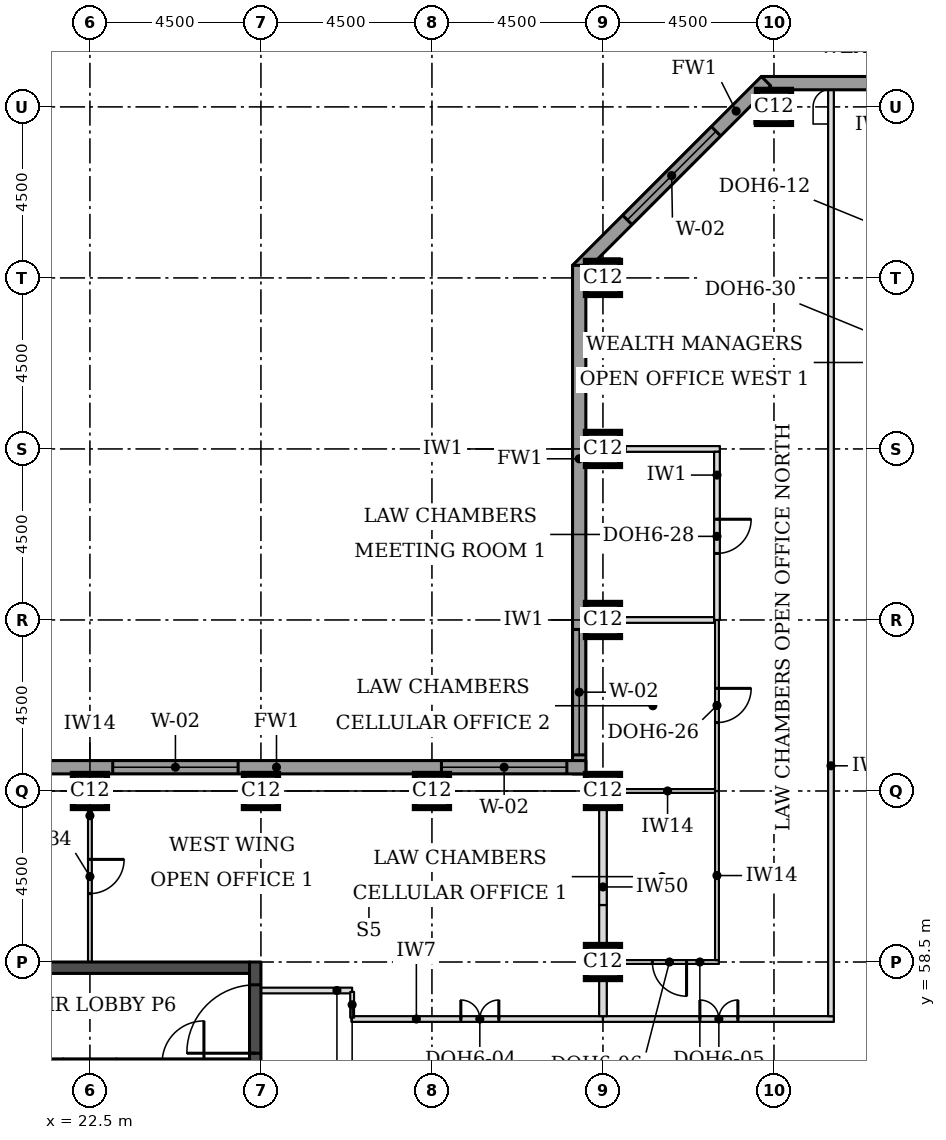
"""IFC4 building model, lengths in metres.
Left out: names, types, materials, properties, quantities, classifications, styles, units other than length and angle.
Written with IfcOpenShell. Run it as: python <this file> out.ifc"""

import sys

from ifc_helpers import new_model, si_unit, direction, frame, frame_2d, origin, origin_2d, place, context, subcontext, project, spatial, rectangle, extrude, element, fill, save


model = new_model("IFC4")
c1 = context("Model", 3, precision=1e-05, world=origin(), true_north=direction((0.0, 1.0)))
c2 = subcontext(c1, "Body", "Model", "MODEL_VIEW")
j1 = project(units=[si_unit("LENGTHUNIT", "METRE"), si_unit("PLANEANGLEUNIT", "RADIAN")], contexts=[c1])
p1 = place(None, origin())
s1 = spatial("IfcSite", under=j1, at=p1, CompositionType="ELEMENT")
p2 = place(p1, origin())
s2 = spatial("IfcBuilding", under=s1, at=p2, CompositionType="ELEMENT")
p3 = place(p2, frame((0.0, 0.0, 184.7)))
s3 = spatial("IfcBuildingStorey", under=s2, at=p3, CompositionType="ELEMENT", Elevation=184.7)
for number, where, z_axis, x_axis in (
    (1, (36.0, 58.5, 0.0), (0.0, 0.0, 1.0), (1.0, 0.0, 0.0)),
    (2, (22.5, 63.0, 0.0), (0.0, 0.0, 1.0), (1.0, 0.0, 0.0)),
    (3, (27.0, 63.0, 0.0), (0.0, 0.0, 1.0), (1.0, 0.0, 0.0)),
    (4, (31.5, 63.0, 0.0), (0.0, 0.0, 1.0), (1.0, 0.0, 0.0)),
    (5, (36.0, 63.0, 0.0), (0.0, 0.0, 1.0), (1.0, 0.0, 0.0)),
    (6, (36.0, 67.5, 0.0), (0.0, 0.0, 1.0), (1.0, 0.0, 0.0)),
    (7, (36.0, 72.0, 0.0), (0.0, 0.0, 1.0), (1.0, 0.0, 0.0)),
    (8, (36.0, 76.5, 0.0), (0.0, 0.0, 1.0), (1.0, 0.0, 0.0)),
    (9, (40.5, 81.0, 0.0), (0.0, 0.0, 1.0), (1.0, 0.0, 0.0)),
):
    element("IfcColumn", number, at=place(p3, frame(where, z_axis=z_axis, x_axis=x_axis)), inside=s3, PredefinedType="COLUMN", context=c2, shape_type="SweptSolid", body=[
        extrude(rectangle(XDim=0.9, YDim=0.9, at=origin_2d()), origin(), (0.0, 0.0, 1.0), 3.7),
    ])
p4 = place(p3, frame((18.3, 58.35, 0.0), z_axis=(0.0, 0.0, 1.0), x_axis=(1.0, 0.0, 0.0)))
e10 = element("IfcWall", 10, at=p4, inside=s3, PredefinedType="SHEAR", context=c2, shape_type="SweptSolid", body=[
    extrude(rectangle(XDim=8.4, YDim=0.3, at=frame_2d((4.2, 0.0))), origin(), (0.0, 0.0, 1.0), 3.7),
])
p5 = place(p3, frame((26.85, 49.5, 0.0), z_axis=(0.0, 0.0, 1.0), x_axis=(0.0, 1.0, 0.0)))
e11 = element("IfcWall", 11, at=p5, inside=s3, PredefinedType="SHEAR", context=c2, shape_type="SweptSolid", body=[
    extrude(rectangle(XDim=9.0, YDim=0.3, at=frame_2d((4.5, 0.0))), origin(), (0.0, 0.0, 1.0), 3.7),
])
p6 = place(p5, frame((6.6, 0.0, 0.0)))
e12 = element("IfcOpeningElement", 12, at=p6, cuts=e11, PredefinedType="OPENING", context=c2, shape_type="SweptSolid", body=[
    extrude(rectangle(XDim=1.8, YDim=2.1, at=frame_2d((0.9, 1.05))), frame((0.0, 0.16, 0.0), z_axis=(0.0, -1.0, 0.0), x_axis=(1.0, 0.0, 0.0)), (0.0, 0.0, 1.0), 0.32),
])
p7 = place(p3, frame((72.331, 81.625, 0.0), z_axis=(0.0, 0.0, 1.0), x_axis=(-1.0, 0.0, 0.0)))
e13 = element("IfcWall", 13, at=p7, inside=s3, PredefinedType="STANDARD", context=c2, shape_type="SweptSolid", body=[
    extrude(rectangle(XDim=32.163, YDim=0.35, at=frame_2d((16.081, 0.0))), origin(), (0.0, 0.0, 1.0), 3.525),
])
p8 = place(p7, frame((5.431, 0.0, 0.9)))
e14 = element("IfcOpeningElement", 14, at=p8, cuts=e13, PredefinedType="OPENING", context=c2, shape_type="SweptSolid", body=[
    extrude(rectangle(XDim=3.3, YDim=1.9, at=frame_2d((1.65, 0.95))), frame((0.0, 0.185, 0.0), z_axis=(0.0, -1.0, 0.0), x_axis=(1.0, 0.0, 0.0)), (0.0, 0.0, 1.0), 0.37),
])
p9 = place(p7, frame((9.931, 0.0, 0.9)))
e15 = element("IfcOpeningElement", 15, at=p9, cuts=e13, PredefinedType="OPENING", context=c2, shape_type="SweptSolid", body=[
    extrude(rectangle(XDim=3.3, YDim=1.9, at=frame_2d((1.65, 0.95))), frame((0.0, 0.185, 0.0), z_axis=(0.0, -1.0, 0.0), x_axis=(1.0, 0.0, 0.0)), (0.0, 0.0, 1.0), 0.37),
])
p10 = place(p7, frame((14.431, 0.0, 0.9)))
e16 = element("IfcOpeningElement", 16, at=p10, cuts=e13, PredefinedType="OPENING", context=c2, shape_type="SweptSolid", body=[
    extrude(rectangle(XDim=3.3, YDim=1.9, at=frame_2d((1.65, 0.95))), frame((0.0, 0.185, 0.0), z_axis=(0.0, -1.0, 0.0), x_axis=(1.0, 0.0, 0.0)), (0.0, 0.0, 1.0), 0.37),
])
p11 = place(p7, frame((18.931, 0.0, 0.9)))
e17 = element("IfcOpeningElement", 17, at=p11, cuts=e13, PredefinedType="OPENING", context=c2, shape_type="SweptSolid", body=[
    extrude(rectangle(XDim=3.3, YDim=1.9, at=frame_2d((1.65, 0.95))), frame((0.0, 0.185, 0.0), z_axis=(0.0, -1.0, 0.0), x_axis=(1.0, 0.0, 0.0)), (0.0, 0.0, 1.0), 0.37),
])
p12 = place(p7, frame((23.431, 0.0, 0.9)))
e18 = element("IfcOpeningElement", 18, at=p12, cuts=e13, PredefinedType="OPENING", context=c2, shape_type="SweptSolid", body=[
    extrude(rectangle(XDim=3.3, YDim=1.9, at=frame_2d((1.65, 0.95))), frame((0.0, 0.185, 0.0), z_axis=(0.0, -1.0, 0.0), x_axis=(1.0, 0.0, 0.0)), (0.0, 0.0, 1.0), 0.37),
])
p13 = place(p3, frame((40.292, 81.676, 0.0), z_axis=(0.0, 0.0, 1.0), x_axis=(-0.707106781187, -0.707106781187, 0.0)))
e19 = element("IfcWall", 19, at=p13, inside=s3, PredefinedType="STANDARD", context=c2, shape_type="SweptSolid", body=[
    extrude(rectangle(XDim=7.027, YDim=0.35, at=frame_2d((3.513, 0.0))), origin(), (0.0, 0.0, 1.0), 3.525),
])
p14 = place(p13, frame((1.863, 0.0, 0.9)))
e20 = element("IfcOpeningElement", 20, at=p14, cuts=e19, PredefinedType="OPENING", context=c2, shape_type="SweptSolid", body=[
    extrude(rectangle(XDim=3.3, YDim=1.9, at=frame_2d((1.65, 0.95))), frame((0.0, 0.185, 0.0), z_axis=(0.0, -1.0, 0.0), x_axis=(1.0, 0.0, 0.0)), (0.0, 0.0, 1.0), 0.37),
])
p15 = place(p3, frame((35.375, 76.831, 0.0), z_axis=(0.0, 0.0, 1.0), x_axis=(0.0, -1.0, 0.0)))
e21 = element("IfcWall", 21, at=p15, inside=s3, PredefinedType="STANDARD", context=c2, shape_type="SweptSolid", body=[
    extrude(rectangle(XDim=13.381, YDim=0.35, at=frame_2d((6.691, 0.0))), origin(), (0.0, 0.0, 1.0), 3.525),
])
p16 = place(p15, frame((9.581, 0.0, 0.9)))
e22 = element("IfcOpeningElement", 22, at=p16, cuts=e21, PredefinedType="OPENING", context=c2, shape_type="SweptSolid", body=[
    extrude(rectangle(XDim=3.3, YDim=1.9, at=frame_2d((1.65, 0.95))), frame((0.0, 0.185, 0.0), z_axis=(0.0, -1.0, 0.0), x_axis=(1.0, 0.0, 0.0)), (0.0, 0.0, 1.0), 0.37),
])
p17 = place(p3, frame((35.55, 63.625, 0.0), z_axis=(0.0, 0.0, 1.0), x_axis=(-1.0, 0.0, 0.0)))
e23 = element("IfcWall", 23, at=p17, inside=s3, PredefinedType="STANDARD", context=c2, shape_type="SweptSolid", body=[
    extrude(rectangle(XDim=17.881, YDim=0.35, at=frame_2d((8.941, 0.0))), origin(), (0.0, 0.0, 1.0), 3.525),
])
p18 = place(p17, frame((0.5, 0.0, 0.9)))
e24 = element("IfcOpeningElement", 24, at=p18, cuts=e23, PredefinedType="OPENING", context=c2, shape_type="SweptSolid", body=[
    extrude(rectangle(XDim=3.3, YDim=1.9, at=frame_2d((1.65, 0.95))), frame((0.0, 0.185, 0.0), z_axis=(0.0, -1.0, 0.0), x_axis=(1.0, 0.0, 0.0)), (0.0, 0.0, 1.0), 0.37),
])
p19 = place(p17, frame((9.15, 0.0, 0.9)))
e25 = element("IfcOpeningElement", 25, at=p19, cuts=e23, PredefinedType="OPENING", context=c2, shape_type="SweptSolid", body=[
    extrude(rectangle(XDim=3.3, YDim=1.9, at=frame_2d((1.65, 0.95))), frame((0.0, 0.185, 0.0), z_axis=(0.0, -1.0, 0.0), x_axis=(1.0, 0.0, 0.0)), (0.0, 0.0, 1.0), 0.37),
])
p20 = place(p3, frame((29.38, 57.0, 0.0), z_axis=(0.0, 0.0, 1.0), x_axis=(1.0, 0.0, 0.0)))
e26 = element("IfcWall", 26, at=p20, inside=s3, PredefinedType="PARTITIONING", context=c2, shape_type="SweptSolid", body=[
    extrude(rectangle(XDim=6.62, YDim=0.15, at=frame_2d((3.31, 0.0))), origin(), (0.0, 0.0, 1.0), 3.55),
])
p21 = place(p20, frame((2.88, 0.0, 0.0)))
e27 = element("IfcOpeningElement", 27, at=p21, cuts=e26, PredefinedType="OPENING", context=c2, shape_type="SweptSolid", body=[
    extrude(rectangle(XDim=1.0, YDim=2.1, at=frame_2d((0.5, 1.05))), frame((0.0, 0.085, 0.0), z_axis=(0.0, -1.0, 0.0), x_axis=(1.0, 0.0, 0.0)), (0.0, 0.0, 1.0), 0.17),
])
p22 = place(p3, frame((36.0, 57.0, 0.0), z_axis=(0.0, 0.0, 1.0), x_axis=(1.0, 0.0, 0.0)))
e28 = element("IfcWall", 28, at=p22, inside=s3, PredefinedType="PARTITIONING", context=c2, shape_type="SweptSolid", body=[
    extrude(rectangle(XDim=6.075, YDim=0.15, at=frame_2d((3.038, 0.0))), origin(), (0.0, 0.0, 1.0), 3.55),
])
p23 = place(p22, frame((2.55, 0.0, 0.0)))
e29 = element("IfcOpeningElement", 29, at=p23, cuts=e28, PredefinedType="OPENING", context=c2, shape_type="SweptSolid", body=[
    extrude(rectangle(XDim=1.0, YDim=2.1, at=frame_2d((0.5, 1.05))), frame((0.0, 0.085, 0.0), z_axis=(0.0, -1.0, 0.0), x_axis=(1.0, 0.0, 0.0)), (0.0, 0.0, 1.0), 0.17),
])
p24 = place(p3, frame((36.45, 58.5, 0.0), z_axis=(0.0, 0.0, 1.0), x_axis=(1.0, 0.0, 0.0)))
e30 = element("IfcWall", 30, at=p24, inside=s3, PredefinedType="PARTITIONING", context=c2, shape_type="SweptSolid", body=[
    extrude(rectangle(XDim=2.6, YDim=0.1, at=frame_2d((1.3, 0.0))), origin(), (0.0, 0.0, 1.0), 3.55),
])
p25 = place(p24, frame((0.85, 0.0, 0.0)))
e31 = element("IfcOpeningElement", 31, at=p25, cuts=e30, PredefinedType="OPENING", context=c2, shape_type="SweptSolid", body=[
    extrude(rectangle(XDim=0.9, YDim=2.1, at=frame_2d((0.45, 1.05))), frame((0.0, 0.06, 0.0), z_axis=(0.0, -1.0, 0.0), x_axis=(1.0, 0.0, 0.0)), (0.0, 0.0, 1.0), 0.12),
])
p26 = place(p3, frame((36.45, 63.0, 0.0), z_axis=(0.0, 0.0, 1.0), x_axis=(1.0, 0.0, 0.0)))
e32 = element("IfcWall", 32, at=p26, inside=s3, PredefinedType="PARTITIONING", context=c2, shape_type="SweptSolid", body=[
    extrude(rectangle(XDim=2.5, YDim=0.1, at=frame_2d((1.25, 0.0))), origin(), (0.0, 0.0, 1.0), 3.55),
])
p27 = place(p3, frame((35.55, 67.5, 0.0), z_axis=(0.0, 0.0, 1.0), x_axis=(1.0, 0.0, 0.0)))
e33 = element("IfcWall", 33, at=p27, inside=s3, PredefinedType="PARTITIONING", context=c2, shape_type="SweptSolid", body=[
    extrude(rectangle(XDim=3.375, YDim=0.15, at=frame_2d((1.688, 0.0))), origin(), (0.0, 0.0, 1.0), 3.55),
])
p28 = place(p3, frame((35.55, 72.0, 0.0), z_axis=(0.0, 0.0, 1.0), x_axis=(1.0, 0.0, 0.0)))
e34 = element("IfcWall", 34, at=p28, inside=s3, PredefinedType="PARTITIONING", context=c2, shape_type="SweptSolid", body=[
    extrude(rectangle(XDim=3.525, YDim=0.15, at=frame_2d((1.762, 0.0))), origin(), (0.0, 0.0, 1.0), 3.55),
])
p29 = place(p3, frame((36.0, 57.075, 0.0), z_axis=(0.0, 0.0, 1.0), x_axis=(0.0, 1.0, 0.0)))
e35 = element("IfcWall", 35, at=p29, inside=s3, PredefinedType="PARTITIONING", context=c2, shape_type="SweptSolid", body=[
    extrude(rectangle(XDim=0.975, YDim=0.2, at=frame_2d((0.488, 0.0))), origin(), (0.0, 0.0, 1.0), 2.8),
])
p30 = place(p3, frame((42.0, 57.075, 0.0), z_axis=(0.0, 0.0, 1.0), x_axis=(0.0, 1.0, 0.0)))
e36 = element("IfcWall", 36, at=p30, inside=s3, PredefinedType="PARTITIONING", context=c2, shape_type="SweptSolid", body=[
    extrude(rectangle(XDim=24.375, YDim=0.15, at=frame_2d((12.188, 0.0))), origin(), (0.0, 0.0, 1.0), 3.55),
])
p31 = place(p3, frame((39.0, 58.55, 0.0), z_axis=(0.0, 0.0, 1.0), x_axis=(0.0, 1.0, 0.0)))
e37 = element("IfcWall", 37, at=p31, inside=s3, PredefinedType="PARTITIONING", context=c2, shape_type="SweptSolid", body=[
    extrude(rectangle(XDim=4.45, YDim=0.1, at=frame_2d((2.225, 0.0))), origin(), (0.0, 0.0, 1.0), 3.55),
])
p32 = place(p3, frame((36.0, 58.92, 0.0), z_axis=(0.0, 0.0, 1.0), x_axis=(0.0, 1.0, 0.0)))
e38 = element("IfcWall", 38, at=p32, inside=s3, PredefinedType="PARTITIONING", context=c2, shape_type="SweptSolid", body=[
    extrude(rectangle(XDim=1.08, YDim=0.2, at=frame_2d((0.54, 0.0))), origin(), (0.0, 0.0, 1.0), 2.8),
])
p33 = place(p3, frame((36.0, 60.0, 0.0), z_axis=(0.0, 0.0, 1.0), x_axis=(0.0, 1.0, 0.0)))
e39 = element("IfcWall", 39, at=p33, inside=s3, PredefinedType="PARTITIONING", context=c2, shape_type="SweptSolid", body=[
    extrude(rectangle(XDim=2.55, YDim=0.2, at=frame_2d((1.275, 0.0))), origin(), (0.0, 0.0, 1.0), 2.8),
])
p34 = place(p3, frame((39.0, 63.0, 0.0), z_axis=(0.0, 0.0, 1.0), x_axis=(0.0, 1.0, 0.0)))
e40 = element("IfcWall", 40, at=p34, inside=s3, PredefinedType="PARTITIONING", context=c2, shape_type="SweptSolid", body=[
    extrude(rectangle(XDim=4.5, YDim=0.1, at=frame_2d((2.25, 0.0))), origin(), (0.0, 0.0, 1.0), 3.55),
])
p35 = place(p34, frame((1.8, 0.0, 0.0)))
e41 = element("IfcOpeningElement", 41, at=p35, cuts=e40, PredefinedType="OPENING", context=c2, shape_type="SweptSolid", body=[
    extrude(rectangle(XDim=0.9, YDim=2.1, at=frame_2d((0.45, 1.05))), frame((0.0, 0.06, 0.0), z_axis=(0.0, -1.0, 0.0), x_axis=(1.0, 0.0, 0.0)), (0.0, 0.0, 1.0), 0.12),
])
p36 = place(p3, frame((39.0, 67.5, 0.0), z_axis=(0.0, 0.0, 1.0), x_axis=(0.0, 1.0, 0.0)))
e42 = element("IfcWall", 42, at=p36, inside=s3, PredefinedType="PARTITIONING", context=c2, shape_type="SweptSolid", body=[
    extrude(rectangle(XDim=4.425, YDim=0.15, at=frame_2d((2.212, 0.0))), origin(), (0.0, 0.0, 1.0), 3.55),
])
p37 = place(p36, frame((1.75, 0.0, 0.0)))
e43 = element("IfcOpeningElement", 43, at=p37, cuts=e42, PredefinedType="OPENING", context=c2, shape_type="SweptSolid", body=[
    extrude(rectangle(XDim=0.9, YDim=2.1, at=frame_2d((0.45, 1.05))), frame((0.0, 0.085, 0.0), z_axis=(0.0, -1.0, 0.0), x_axis=(1.0, 0.0, 0.0)), (0.0, 0.0, 1.0), 0.17),
])
p38 = place(p3, frame((22.5, 63.0, 0.0), z_axis=(0.0, 0.0, 1.0), x_axis=(0.0, -1.0, 0.0)))
e44 = element("IfcWall", 44, at=p38, inside=s3, PredefinedType="PARTITIONING", context=c2, shape_type="SweptSolid", body=[
    extrude(rectangle(XDim=4.5, YDim=0.1, at=frame_2d((2.25, 0.0))), origin(), (0.0, 0.0, 1.0), 3.55),
])
p39 = place(p38, frame((1.8, 0.0, 0.0)))
e45 = element("IfcOpeningElement", 45, at=p39, cuts=e44, PredefinedType="OPENING", context=c2, shape_type="SweptSolid", body=[
    extrude(rectangle(XDim=0.9, YDim=2.1, at=frame_2d((0.45, 1.05))), frame((0.0, 0.06, 0.0), z_axis=(0.0, -1.0, 0.0), x_axis=(1.0, 0.0, 0.0)), (0.0, 0.0, 1.0), 0.12),
])
p40 = place(p3, frame((27.0, 57.75, 0.0), z_axis=(0.0, 0.0, 1.0), x_axis=(1.0, 0.0, 0.0)))
e46 = element("IfcWall", 46, at=p40, inside=s3, PredefinedType="PARTITIONING", context=c2, shape_type="SweptSolid", body=[
    extrude(rectangle(XDim=2.4, YDim=0.15, at=frame_2d((1.2, 0.0))), origin(), (0.0, 0.0, 1.0), 3.55),
])
p41 = place(p3, frame((29.4, 57.715, 0.0), z_axis=(0.0, 0.0, 1.0), x_axis=(0.0, -1.0, 0.0)))
e47 = element("IfcWall", 47, at=p41, inside=s3, PredefinedType="PARTITIONING", context=c2, shape_type="SweptSolid", body=[
    extrude(rectangle(XDim=0.68, YDim=0.1, at=frame_2d((0.34, 0.0))), origin(), (0.0, 0.0, 1.0), 3.55),
])
p42 = place(p3, frame((21.8, 55.85, 0.0), z_axis=(0.0, 0.0, 1.0), x_axis=(1.0, 0.0, 0.0)))
e48 = element("IfcWall", 48, at=p42, inside=s3, PredefinedType="SOLIDWALL", context=c2, shape_type="SweptSolid", body=[
    extrude(rectangle(XDim=1.4, YDim=0.2, at=frame_2d((0.7, 0.0))), origin(), (0.0, 0.0, 1.0), 3.55),
])
p43 = place(p3, frame((18.3, 55.85, 0.0), z_axis=(0.0, 0.0, 1.0), x_axis=(1.0, 0.0, 0.0)))
e49 = element("IfcWall", 49, at=p43, inside=s3, PredefinedType="SOLIDWALL", context=c2, shape_type="SweptSolid", body=[
    extrude(rectangle(XDim=3.5, YDim=0.2, at=frame_2d((1.75, 0.0))), origin(), (0.0, 0.0, 1.0), 3.55),
])
p44 = place(p43, frame((1.2, 0.0, 0.0)))
e50 = element("IfcOpeningElement", 50, at=p44, cuts=e49, PredefinedType="OPENING", context=c2, shape_type="SweptSolid", body=[
    extrude(rectangle(XDim=1.1, YDim=2.1, at=frame_2d((0.55, 1.05))), frame((0.0, 0.11, 0.0), z_axis=(0.0, -1.0, 0.0), x_axis=(1.0, 0.0, 0.0)), (0.0, 0.0, 1.0), 0.22),
])
p45 = place(p3, frame((23.2, 55.85, 0.0), z_axis=(0.0, 0.0, 1.0), x_axis=(1.0, 0.0, 0.0)))
e51 = element("IfcWall", 51, at=p45, inside=s3, PredefinedType="SOLIDWALL", context=c2, shape_type="SweptSolid", body=[
    extrude(rectangle(XDim=3.5, YDim=0.2, at=frame_2d((1.75, 0.0))), origin(), (0.0, 0.0, 1.0), 3.55),
])
p46 = place(p45, frame((1.2, 0.0, 0.0)))
e52 = element("IfcOpeningElement", 52, at=p46, cuts=e51, PredefinedType="OPENING", context=c2, shape_type="SweptSolid", body=[
    extrude(rectangle(XDim=1.1, YDim=2.1, at=frame_2d((0.55, 1.05))), frame((0.0, 0.11, 0.0), z_axis=(0.0, -1.0, 0.0), x_axis=(1.0, 0.0, 0.0)), (0.0, 0.0, 1.0), 0.22),
])
p47 = place(p14, origin())
e53 = element("IfcWindow", 53, at=p47, inside=s3, PartitioningType="SINGLE_PANEL", PredefinedType="WINDOW", context=c2, shape_type="SweptSolid", body=[
    extrude(rectangle(XDim=3.3, YDim=1.9, at=frame_2d((1.65, 0.95))), frame((0.0, 0.085, 0.0), z_axis=(0.0, -1.0, 0.0), x_axis=(1.0, 0.0, 0.0)), (0.0, 0.0, 1.0), 0.06),
])
fill(e20, e53)
p48 = place(p16, origin())
e54 = element("IfcWindow", 54, at=p48, inside=s3, PartitioningType="SINGLE_PANEL", PredefinedType="WINDOW", context=c2, shape_type="SweptSolid", body=[
    extrude(rectangle(XDim=3.3, YDim=1.9, at=frame_2d((1.65, 0.95))), frame((0.0, 0.085, 0.0), z_axis=(0.0, -1.0, 0.0), x_axis=(1.0, 0.0, 0.0)), (0.0, 0.0, 1.0), 0.06),
])
fill(e22, e54)
p49 = place(p18, origin())
e55 = element("IfcWindow", 55, at=p49, inside=s3, PartitioningType="SINGLE_PANEL", PredefinedType="WINDOW", context=c2, shape_type="SweptSolid", body=[
    extrude(rectangle(XDim=3.3, YDim=1.9, at=frame_2d((1.65, 0.95))), frame((0.0, 0.085, 0.0), z_axis=(0.0, -1.0, 0.0), x_axis=(1.0, 0.0, 0.0)), (0.0, 0.0, 1.0), 0.06),
])
fill(e24, e55)
p50 = place(p19, origin())
e56 = element("IfcWindow", 56, at=p50, inside=s3, PartitioningType="SINGLE_PANEL", PredefinedType="WINDOW", context=c2, shape_type="SweptSolid", body=[
    extrude(rectangle(XDim=3.3, YDim=1.9, at=frame_2d((1.65, 0.95))), frame((0.0, 0.085, 0.0), z_axis=(0.0, -1.0, 0.0), x_axis=(1.0, 0.0, 0.0)), (0.0, 0.0, 1.0), 0.06),
])
fill(e25, e56)
p51 = place(p23, origin())
e57 = element("IfcDoor", 57, at=p51, inside=s3, OperationType="DOUBLE_DOOR_SINGLE_SWING", PredefinedType="DOOR", context=c2, shape_type="SweptSolid", body=[
    extrude(rectangle(XDim=1.0, YDim=2.1, at=frame_2d((0.5, 1.05))), frame((0.0, 0.025, 0.0), z_axis=(0.0, -1.0, 0.0), x_axis=(1.0, 0.0, 0.0)), (0.0, 0.0, 1.0), 0.05),
])
fill(e29, e57)
p52 = place(p25, frame((0.9, 0.0, 0.0), z_axis=(0.0, 0.0, 1.0), x_axis=(-1.0, 0.0, 0.0)))
e58 = element("IfcDoor", 58, at=p52, inside=s3, OperationType="SINGLE_SWING_LEFT", PredefinedType="DOOR", context=c2, shape_type="SweptSolid", body=[
    extrude(rectangle(XDim=0.9, YDim=2.1, at=frame_2d((0.45, 1.05))), frame((0.0, 0.025, 0.0), z_axis=(0.0, -1.0, 0.0), x_axis=(1.0, 0.0, 0.0)), (0.0, 0.0, 1.0), 0.05),
])
fill(e31, e58)
p53 = place(p35, frame((0.9, 0.0, 0.0), z_axis=(0.0, 0.0, 1.0), x_axis=(-1.0, 0.0, 0.0)))
e59 = element("IfcDoor", 59, at=p53, inside=s3, OperationType="SINGLE_SWING_LEFT", PredefinedType="DOOR", context=c2, shape_type="SweptSolid", body=[
    extrude(rectangle(XDim=0.9, YDim=2.1, at=frame_2d((0.45, 1.05))), frame((0.0, 0.025, 0.0), z_axis=(0.0, -1.0, 0.0), x_axis=(1.0, 0.0, 0.0)), (0.0, 0.0, 1.0), 0.05),
])
fill(e41, e59)
p54 = place(p37, frame((0.9, 0.0, 0.0), z_axis=(0.0, 0.0, 1.0), x_axis=(-1.0, 0.0, 0.0)))
e60 = element("IfcDoor", 60, at=p54, inside=s3, OperationType="SINGLE_SWING_LEFT", PredefinedType="DOOR", context=c2, shape_type="SweptSolid", body=[
    extrude(rectangle(XDim=0.9, YDim=2.1, at=frame_2d((0.45, 1.05))), frame((0.0, 0.025, 0.0), z_axis=(0.0, -1.0, 0.0), x_axis=(1.0, 0.0, 0.0)), (0.0, 0.0, 1.0), 0.05),
])
fill(e43, e60)
p55 = place(p21, origin())
e61 = element("IfcDoor", 61, at=p55, inside=s3, OperationType="DOUBLE_DOOR_SINGLE_SWING", PredefinedType="DOOR", context=c2, shape_type="SweptSolid", body=[
    extrude(rectangle(XDim=1.0, YDim=2.1, at=frame_2d((0.5, 1.05))), frame((0.0, 0.025, 0.0), z_axis=(0.0, -1.0, 0.0), x_axis=(1.0, 0.0, 0.0)), (0.0, 0.0, 1.0), 0.05),
])
fill(e27, e61)
p56 = place(p39, origin())
e62 = element("IfcDoor", 62, at=p56, inside=s3, OperationType="SINGLE_SWING_LEFT", PredefinedType="DOOR", context=c2, shape_type="SweptSolid", body=[
    extrude(rectangle(XDim=0.9, YDim=2.1, at=frame_2d((0.45, 1.05))), frame((0.0, 0.025, 0.0), z_axis=(0.0, -1.0, 0.0), x_axis=(1.0, 0.0, 0.0)), (0.0, 0.0, 1.0), 0.05),
])
fill(e45, e62)
p57 = place(p6, origin())
e63 = element("IfcDoor", 63, at=p57, inside=s3, OperationType="SINGLE_SWING_LEFT", PredefinedType="DOOR", context=c2, shape_type="SweptSolid", body=[
    extrude(rectangle(XDim=1.8, YDim=2.1, at=frame_2d((0.9, 1.05))), frame((0.0, 0.025, 0.0), z_axis=(0.0, -1.0, 0.0), x_axis=(1.0, 0.0, 0.0)), (0.0, 0.0, 1.0), 0.05),
])
fill(e12, e63)
save(model, sys.argv[1])
